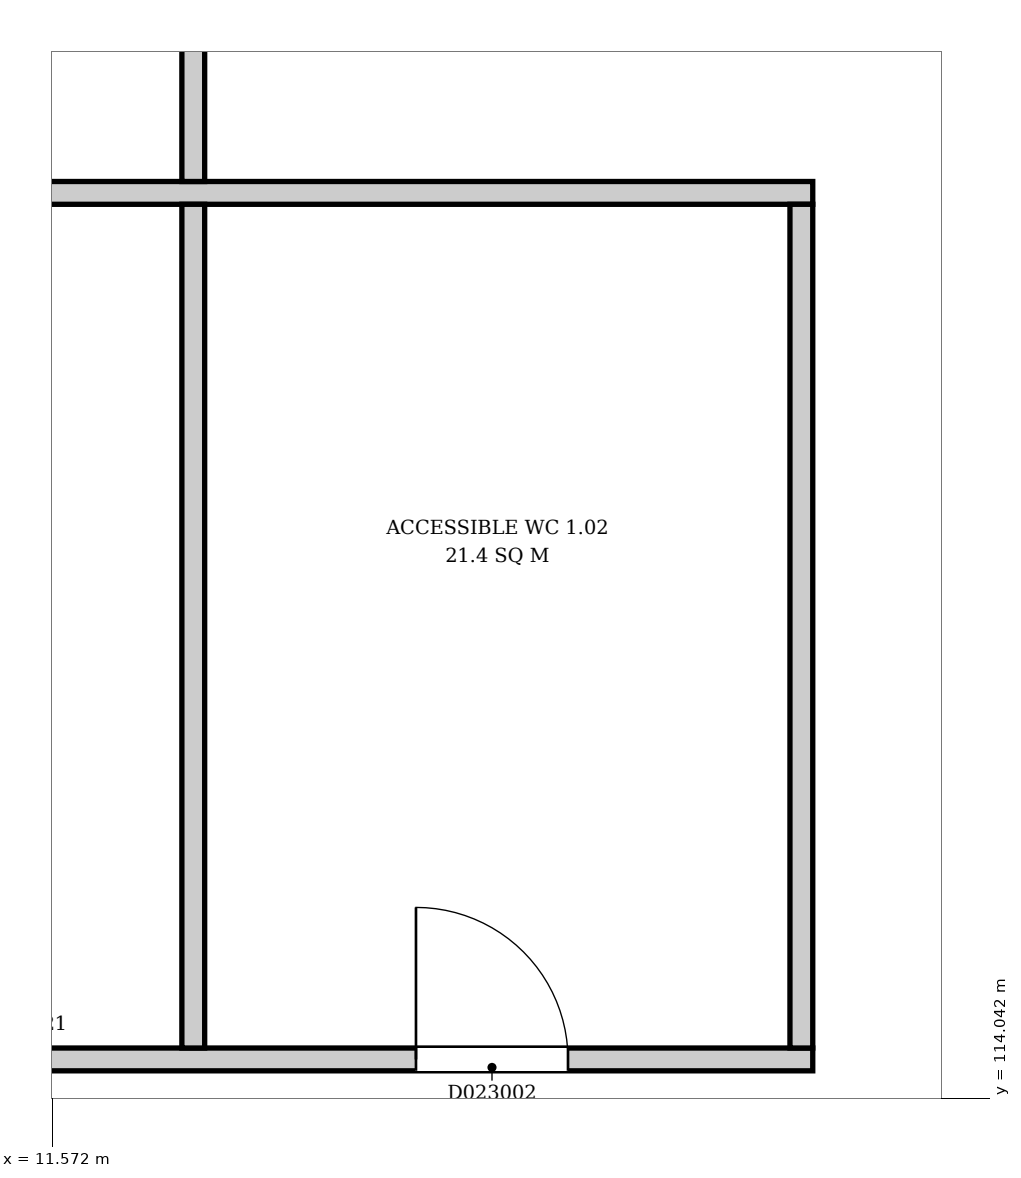
"""IFC4 building model, lengths in metres.
Left out: names, types, materials, properties, quantities, classifications, styles, units other than length and angle.
Written with IfcOpenShell. Run it as: python <this file> out.ifc"""

import sys

from ifc_helpers import new_model, si_unit, direction, frame, frame_2d, origin, place, context, subcontext, project, spatial, rectangle, extrude, element, fill, save


model = new_model("IFC4")
c1 = context("Model", 3, precision=1e-05, world=origin(), true_north=direction((0.0, 1.0)))
c2 = subcontext(c1, "Body", "Model", "MODEL_VIEW")
j1 = project(units=[si_unit("LENGTHUNIT", "METRE"), si_unit("PLANEANGLEUNIT", "RADIAN")], contexts=[c1])
p1 = place(None, origin())
s1 = spatial("IfcSite", under=j1, at=p1, CompositionType="ELEMENT")
p2 = place(p1, origin())
s2 = spatial("IfcBuilding", under=s1, at=p2, CompositionType="ELEMENT")
p3 = place(p2, frame((0.0, 0.0, 6.5)))
s3 = spatial("IfcBuildingStorey", under=s2, at=p3, CompositionType="ELEMENT", Elevation=6.5)
p4 = place(p3, frame((6.425, 114.3, 0.0), z_axis=(0.0, 0.0, 1.0), x_axis=(1.0, 0.0, 0.0)))
e1 = element("IfcWall", 1, at=p4, inside=s3, PredefinedType="PARTITIONING", context=c2, shape_type="SweptSolid", body=[
    extrude(rectangle(XDim=10.15, YDim=0.15, at=frame_2d((5.075, 0.0))), origin(), (0.0, 0.0, 1.0), 7.29),
])
p5 = place(p4, frame((1.51, 0.0, 0.0)))
e2 = element("IfcOpeningElement", 2, at=p5, cuts=e1, PredefinedType="OPENING", context=c2, shape_type="SweptSolid", body=[
    extrude(rectangle(XDim=1.0, YDim=2.1, at=frame_2d((0.5, 1.05))), frame((0.0, 0.085, 0.0), z_axis=(0.0, -1.0, 0.0), x_axis=(1.0, 0.0, 0.0)), (0.0, 0.0, 1.0), 0.17),
])
p6 = place(p4, frame((7.54, 0.0, 0.0)))
e3 = element("IfcOpeningElement", 3, at=p6, cuts=e1, PredefinedType="OPENING", context=c2, shape_type="SweptSolid", body=[
    extrude(rectangle(XDim=1.0, YDim=2.1, at=frame_2d((0.5, 1.05))), frame((0.0, 0.085, 0.0), z_axis=(0.0, -1.0, 0.0), x_axis=(1.0, 0.0, 0.0)), (0.0, 0.0, 1.0), 0.17),
])
p7 = place(p3, frame((6.575, 120.0, 0.0), z_axis=(0.0, 0.0, 1.0), x_axis=(1.0, 0.0, 0.0)))
e4 = element("IfcWall", 4, at=p7, inside=s3, PredefinedType="PARTITIONING", context=c2, shape_type="SweptSolid", body=[
    extrude(rectangle(XDim=10.0, YDim=0.15, at=frame_2d((5.0, 0.0))), origin(), (0.0, 0.0, 1.0), 7.29),
])
p8 = place(p3, frame((12.5, 114.375, 0.0), z_axis=(0.0, 0.0, 1.0), x_axis=(0.0, 1.0, 0.0)))
e5 = element("IfcWall", 5, at=p8, inside=s3, PredefinedType="PARTITIONING", context=c2, shape_type="SweptSolid", body=[
    extrude(rectangle(XDim=5.55, YDim=0.15, at=frame_2d((2.775, 0.0))), origin(), (0.0, 0.0, 1.0), 7.29),
])
p9 = place(p3, frame((12.5, 120.075, 0.0), z_axis=(0.0, 0.0, 1.0), x_axis=(0.0, 1.0, 0.0)))
e6 = element("IfcWall", 6, at=p9, inside=s3, PredefinedType="PARTITIONING", context=c2, shape_type="SweptSolid", body=[
    extrude(rectangle(XDim=2.85, YDim=0.15, at=frame_2d((1.425, 0.0))), origin(), (0.0, 0.0, 1.0), 7.29),
])
p10 = place(p3, frame((16.5, 114.375, 0.0), z_axis=(0.0, 0.0, 1.0), x_axis=(0.0, 1.0, 0.0)))
e7 = element("IfcWall", 7, at=p10, inside=s3, PredefinedType="PARTITIONING", context=c2, shape_type="SweptSolid", body=[
    extrude(rectangle(XDim=5.55, YDim=0.15, at=frame_2d((2.775, 0.0))), origin(), (0.0, 0.0, 1.0), 7.29),
])
p11 = place(p6, origin())
e8 = element("IfcDoor", 8, at=p11, inside=s3, OperationType="SINGLE_SWING_RIGHT", PredefinedType="DOOR", context=c2, shape_type="SweptSolid", body=[
    extrude(rectangle(XDim=1.0, YDim=2.1, at=frame_2d((0.5, 1.05))), frame((0.0, 0.025, 0.0), z_axis=(0.0, -1.0, 0.0), x_axis=(1.0, 0.0, 0.0)), (0.0, 0.0, 1.0), 0.05),
])
fill(e3, e8)
save(model, sys.argv[1])
